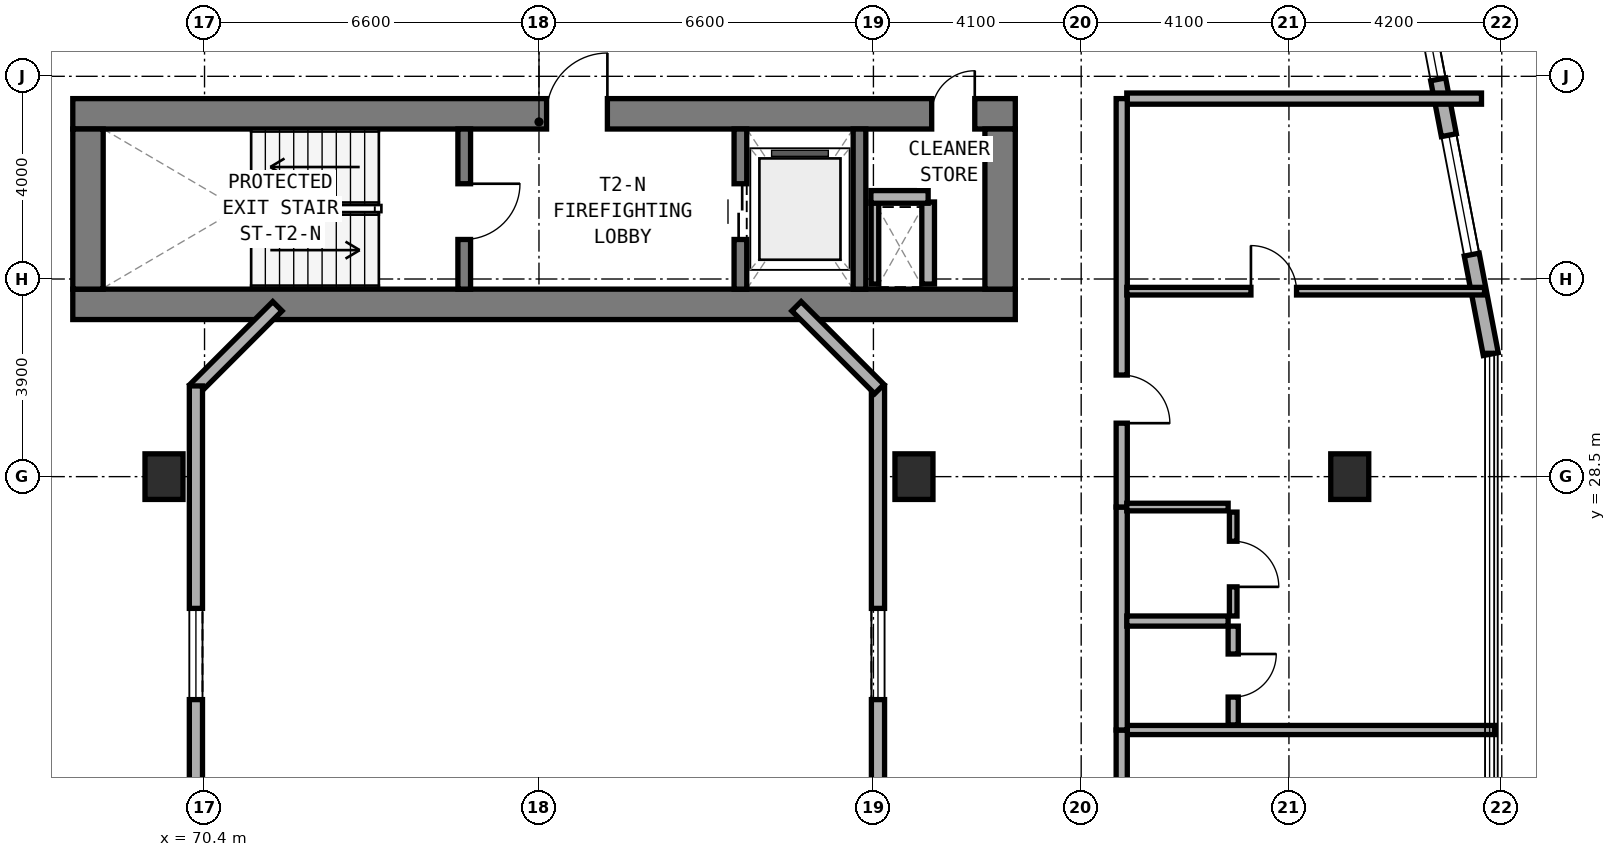
"""IFC4 building model, lengths in metres.
Left out: names, types, materials, properties, quantities, classifications, styles, units other than length and angle.
Written with IfcOpenShell. Run it as: python <this file> out.ifc"""

import sys

from ifc_helpers import new_model, si_unit, direction, frame, frame_2d, origin, origin_2d, place, context, subcontext, project, spatial, rectangle, extrude, element, fill, save


model = new_model("IFC4")
c1 = context("Model", 3, precision=1e-05, world=origin(), true_north=direction((0.0, 1.0)))
c2 = subcontext(c1, "Body", "Model", "MODEL_VIEW")
j1 = project(units=[si_unit("LENGTHUNIT", "METRE"), si_unit("PLANEANGLEUNIT", "RADIAN")], contexts=[c1])
p1 = place(None, origin())
s1 = spatial("IfcSite", under=j1, at=p1, CompositionType="ELEMENT")
p2 = place(p1, origin())
s2 = spatial("IfcBuilding", under=s1, at=p2, CompositionType="ELEMENT")
p3 = place(p2, frame((0.0, 0.0, 48.5)))
s3 = spatial("IfcBuildingStorey", under=s2, at=p3, CompositionType="ELEMENT", Elevation=48.5)
p4 = place(p3, frame((67.8, 31.9, 0.0), z_axis=(0.0, 0.0, 1.0), x_axis=(1.0, 0.0, 0.0)))
e1 = element("IfcWall", 1, at=p4, inside=s3, PredefinedType="SHEAR", context=c2, shape_type="SweptSolid", body=[
    extrude(rectangle(XDim=18.6, YDim=0.6, at=frame_2d((9.3, 0.0))), origin(), (0.0, 0.0, 1.0), 3.5),
])
p5 = place(p3, frame((67.8, 35.66, 0.0), z_axis=(0.0, 0.0, 1.0), x_axis=(1.0, 0.0, 0.0)))
e2 = element("IfcWall", 2, at=p5, inside=s3, PredefinedType="SHEAR", context=c2, shape_type="SweptSolid", body=[
    extrude(rectangle(XDim=18.6, YDim=0.6, at=frame_2d((9.3, 0.0))), origin(), (0.0, 0.0, 1.0), 3.5),
])
p6 = place(p5, frame((9.35, 0.0, 0.0)))
e3 = element("IfcOpeningElement", 3, at=p6, cuts=e2, PredefinedType="OPENING", context=c2, shape_type="SweptSolid", body=[
    extrude(rectangle(XDim=1.2, YDim=2.15, at=frame_2d((0.6, 1.075))), frame((0.0, 0.31, 0.0), z_axis=(0.0, -1.0, 0.0), x_axis=(1.0, 0.0, 0.0)), (0.0, 0.0, 1.0), 0.62),
])
p7 = place(p5, frame((16.95, 0.0, 0.0)))
e4 = element("IfcOpeningElement", 4, at=p7, cuts=e2, PredefinedType="OPENING", context=c2, shape_type="SweptSolid", body=[
    extrude(rectangle(XDim=0.85, YDim=2.1, at=frame_2d((0.425, 1.05))), frame((0.0, 0.31, 0.0), z_axis=(0.0, -1.0, 0.0), x_axis=(1.0, 0.0, 0.0)), (0.0, 0.0, 1.0), 0.62),
])
for number, where, z_axis, x_axis in (
    (5, (68.1, 32.2, 0.0), (0.0, 0.0, 1.0), (0.0, 1.0, 0.0)),
    (6, (86.1, 32.2, 0.0), (0.0, 0.0, 1.0), (0.0, 1.0, 0.0)),
):
    element("IfcWall", number, at=place(p3, frame(where, z_axis=z_axis, x_axis=x_axis)), inside=s3, PredefinedType="SHEAR", context=c2, shape_type="SweptSolid", body=[
        extrude(rectangle(XDim=3.16, YDim=0.6, at=frame_2d((1.58, 0.0))), origin(), (0.0, 0.0, 1.0), 3.5),
    ])
p8 = place(p3, frame((75.525, 32.2, 0.0), z_axis=(0.0, 0.0, 1.0), x_axis=(0.0, 1.0, 0.0)))
e7 = element("IfcWall", 7, at=p8, inside=s3, PredefinedType="STANDARD", context=c2, shape_type="SweptSolid", body=[
    extrude(rectangle(XDim=3.16, YDim=0.25, at=frame_2d((1.58, 0.0))), origin(), (0.0, 0.0, 1.0), 3.25),
])
p9 = place(p8, frame((0.98, 0.0, 0.0)))
e8 = element("IfcOpeningElement", 8, at=p9, cuts=e7, PredefinedType="OPENING", context=c2, shape_type="SweptSolid", body=[
    extrude(rectangle(XDim=1.1, YDim=2.15, at=frame_2d((0.55, 1.075))), frame((0.0, 0.135, 0.0), z_axis=(0.0, -1.0, 0.0), x_axis=(1.0, 0.0, 0.0)), (0.0, 0.0, 1.0), 0.27),
])
p10 = place(p3, frame((80.975, 32.2, 0.0), z_axis=(0.0, 0.0, 1.0), x_axis=(0.0, 1.0, 0.0)))
e9 = element("IfcWall", 9, at=p10, inside=s3, PredefinedType="STANDARD", context=c2, shape_type="SweptSolid", body=[
    extrude(rectangle(XDim=3.16, YDim=0.25, at=frame_2d((1.58, 0.0))), origin(), (0.0, 0.0, 1.0), 3.25),
])
p11 = place(p10, frame((0.98, 0.0, 0.0)))
e10 = element("IfcOpeningElement", 10, at=p11, cuts=e9, PredefinedType="OPENING", context=c2, shape_type="SweptSolid", body=[
    extrude(rectangle(XDim=1.1, YDim=2.15, at=frame_2d((0.55, 1.075))), frame((0.0, 0.135, 0.0), z_axis=(0.0, -1.0, 0.0), x_axis=(1.0, 0.0, 0.0)), (0.0, 0.0, 1.0), 0.27),
])
p12 = place(p3, frame((83.325, 32.2, 0.0), z_axis=(0.0, 0.0, 1.0), x_axis=(0.0, 1.0, 0.0)))
e11 = element("IfcWall", 11, at=p12, inside=s3, PredefinedType="STANDARD", context=c2, shape_type="SweptSolid", body=[
    extrude(rectangle(XDim=3.16, YDim=0.25, at=frame_2d((1.58, 0.0))), origin(), (0.0, 0.0, 1.0), 3.25),
])
for number, where, z_axis, x_axis in (
    (12, (93.0, 28.5, 0.0), (0.0, 0.0, 1.0), (1.0, 0.0, 0.0)),
    (13, (69.6, 28.5, 0.0), (0.0, 0.0, 1.0), (1.0, 0.0, 0.0)),
    (14, (84.4, 28.5, 0.0), (0.0, 0.0, 1.0), (1.0, 0.0, 0.0)),
):
    element("IfcColumn", number, at=place(p3, frame(where, z_axis=z_axis, x_axis=x_axis)), inside=s3, PredefinedType="COLUMN", context=c2, shape_type="SweptSolid", body=[
        extrude(rectangle(XDim=0.75, YDim=0.9, at=origin_2d()), origin(), (0.0, 0.0, 1.0), 3.5),
    ])
p13 = place(p3, frame((95.783, 30.918, 0.0), z_axis=(0.0, 0.0, 1.0), x_axis=(-0.188087874316, 0.982152203854, 0.0)))
e15 = element("IfcWall", 15, at=p13, inside=s3, PredefinedType="STANDARD", context=c2, shape_type="SweptSolid", body=[
    extrude(rectangle(XDim=9.634, YDim=0.3, at=frame_2d((4.817, 0.0))), origin(), (0.0, 0.0, 1.0), 3.25),
])
p14 = place(p13, frame((1.999, 0.0, 0.8)))
e16 = element("IfcOpeningElement", 16, at=p14, cuts=e15, PredefinedType="OPENING", context=c2, shape_type="SweptSolid", body=[
    extrude(rectangle(XDim=2.4, YDim=1.6, at=frame_2d((1.2, 0.8))), frame((0.0, 0.16, 0.0), z_axis=(0.0, -1.0, 0.0), x_axis=(1.0, 0.0, 0.0)), (0.0, 0.0, 1.0), 0.32),
])
p15 = place(p13, frame((5.521, 0.0, 0.85)))
e17 = element("IfcOpeningElement", 17, at=p15, cuts=e15, PredefinedType="OPENING", context=c2, shape_type="SweptSolid", body=[
    extrude(rectangle(XDim=1.2, YDim=1.5, at=frame_2d((0.6, 0.75))), frame((0.0, 0.16, 0.0), z_axis=(0.0, -1.0, 0.0), x_axis=(1.0, 0.0, 0.0)), (0.0, 0.0, 1.0), 0.32),
])
p16 = place(p13, frame((7.682, 0.0, 0.85)))
e18 = element("IfcOpeningElement", 18, at=p16, cuts=e15, PredefinedType="OPENING", context=c2, shape_type="SweptSolid", body=[
    extrude(rectangle(XDim=1.5, YDim=1.5, at=frame_2d((0.75, 0.75))), frame((0.0, 0.16, 0.0), z_axis=(0.0, -1.0, 0.0), x_axis=(1.0, 0.0, 0.0)), (0.0, 0.0, 1.0), 0.32),
])
p17 = place(p3, frame((83.69, 19.71, 0.0), z_axis=(0.0, 0.0, 1.0), x_axis=(0.0, 1.0, 0.0)))
e19 = element("IfcWall", 19, at=p17, inside=s3, PredefinedType="STANDARD", context=c2, shape_type="SweptSolid", body=[
    extrude(rectangle(XDim=10.58, YDim=0.26, at=frame_2d((5.29, 0.0))), origin(), (0.0, 0.0, 1.0), 3.25),
])
p18 = place(p17, frame((4.39, 0.0, 0.85)))
e20 = element("IfcOpeningElement", 20, at=p18, cuts=e19, PredefinedType="OPENING", context=c2, shape_type="SweptSolid", body=[
    extrude(rectangle(XDim=1.8, YDim=1.5, at=frame_2d((0.9, 0.75))), frame((0.0, 0.14, 0.0), z_axis=(0.0, -1.0, 0.0), x_axis=(1.0, 0.0, 0.0)), (0.0, 0.0, 1.0), 0.28),
])
for number, where, z_axis, x_axis in (
    (21, (83.716, 30.228, 0.0), (0.0, 0.0, 1.0), (-0.707, 0.707, 0.0)),
    (22, (71.838, 31.862, 0.0), (0.0, 0.0, 1.0), (-0.707, -0.707, 0.0)),
):
    element("IfcWall", number, at=place(p3, frame(where, z_axis=z_axis, x_axis=x_axis)), inside=s3, PredefinedType="STANDARD", context=c2, shape_type="SweptSolid", body=[
        extrude(rectangle(XDim=2.311, YDim=0.26, at=frame_2d((1.155, 0.0))), origin(), (0.0, 0.0, 1.0), 3.25),
    ])
p19 = place(p3, frame((70.23, 30.29, 0.0), z_axis=(0.0, 0.0, 1.0), x_axis=(0.0, -1.0, 0.0)))
e23 = element("IfcWall", 23, at=p19, inside=s3, PredefinedType="STANDARD", context=c2, shape_type="SweptSolid", body=[
    extrude(rectangle(XDim=10.58, YDim=0.26, at=frame_2d((5.29, 0.0))), origin(), (0.0, 0.0, 1.0), 3.25),
])
p20 = place(p19, frame((4.39, 0.0, 0.85)))
e24 = element("IfcOpeningElement", 24, at=p20, cuts=e23, PredefinedType="OPENING", context=c2, shape_type="SweptSolid", body=[
    extrude(rectangle(XDim=1.8, YDim=1.5, at=frame_2d((0.9, 0.75))), frame((0.0, 0.14, 0.0), z_axis=(0.0, -1.0, 0.0), x_axis=(1.0, 0.0, 0.0)), (0.0, 0.0, 1.0), 0.28),
])
p21 = place(p3, frame((83.63, 32.3, 0.0), z_axis=(0.0, 0.0, 1.0), x_axis=(0.0, 1.0, 0.0)))
e25 = element("IfcWall", 25, at=p21, inside=s3, PredefinedType="PARTITIONING", context=c2, shape_type="SweptSolid", body=[
    extrude(rectangle(XDim=1.62, YDim=0.15, at=frame_2d((0.81, 0.0))), origin(), (0.0, 0.0, 1.0), 2.725),
])
p22 = place(p3, frame((84.68, 32.3, 0.0), z_axis=(0.0, 0.0, 1.0), x_axis=(0.0, 1.0, 0.0)))
e26 = element("IfcWall", 26, at=p22, inside=s3, PredefinedType="SOLIDWALL", context=c2, shape_type="SweptSolid", body=[
    extrude(rectangle(XDim=1.62, YDim=0.25, at=frame_2d((0.81, 0.0))), origin(), (0.0, 0.0, 1.0), 3.22),
])
p23 = place(p3, frame((83.55, 34.02, 0.0), z_axis=(0.0, 0.0, 1.0), x_axis=(1.0, 0.0, 0.0)))
e27 = element("IfcWall", 27, at=p23, inside=s3, PredefinedType="SOLIDWALL", context=c2, shape_type="SweptSolid", body=[
    extrude(rectangle(XDim=1.13, YDim=0.25, at=frame_2d((0.565, 0.0))), origin(), (0.0, 0.0, 1.0), 3.22),
])
p24 = place(p3, frame((88.6, 35.96, 0.0), z_axis=(0.0, 0.0, 1.0), x_axis=(1.0, 0.0, 0.0)))
e28 = element("IfcWall", 28, at=p24, inside=s3, PredefinedType="SOLIDWALL", context=c2, shape_type="SweptSolid", body=[
    extrude(rectangle(XDim=7.0, YDim=0.22, at=frame_2d((3.5, 0.0))), origin(), (0.0, 0.0, 1.0), 2.865),
])
p25 = place(p3, frame((88.5, 23.5, 0.0), z_axis=(0.0, 0.0, 1.0), x_axis=(1.0, 0.0, 0.0)))
e29 = element("IfcWall", 29, at=p25, inside=s3, PredefinedType="SOLIDWALL", context=c2, shape_type="SweptSolid", body=[
    extrude(rectangle(XDim=7.36, YDim=0.18, at=frame_2d((3.68, 0.0))), origin(), (0.0, 0.0, 1.0), 2.865),
])
p26 = place(p3, frame((88.5, 18.44, 0.0), z_axis=(0.0, 0.0, 1.0), x_axis=(0.0, 1.0, 0.0)))
e30 = element("IfcWall", 30, at=p26, inside=s3, PredefinedType="SOLIDWALL", context=c2, shape_type="SweptSolid", body=[
    extrude(rectangle(XDim=5.06, YDim=0.22, at=frame_2d((2.53, 0.0))), origin(), (0.0, 0.0, 1.0), 2.725),
])
p27 = place(p26, frame((2.055, 0.0, 0.0)))
e31 = element("IfcOpeningElement", 31, at=p27, cuts=e30, PredefinedType="OPENING", context=c2, shape_type="SweptSolid", body=[
    extrude(rectangle(XDim=0.95, YDim=2.1, at=frame_2d((0.475, 1.05))), frame((0.0, 0.12, 0.0), z_axis=(0.0, -1.0, 0.0), x_axis=(1.0, 0.0, 0.0)), (0.0, 0.0, 1.0), 0.24),
])
p28 = place(p3, frame((88.5, 23.5, 0.0), z_axis=(0.0, 0.0, 1.0), x_axis=(0.0, 1.0, 0.0)))
e32 = element("IfcWall", 32, at=p28, inside=s3, PredefinedType="SOLIDWALL", context=c2, shape_type="SweptSolid", body=[
    extrude(rectangle(XDim=4.4, YDim=0.22, at=frame_2d((2.2, 0.0))), origin(), (0.0, 0.0, 1.0), 3.22),
])
p29 = place(p3, frame((88.5, 27.9, 0.0), z_axis=(0.0, 0.0, 1.0), x_axis=(0.0, 1.0, 0.0)))
e33 = element("IfcWall", 33, at=p29, inside=s3, PredefinedType="SOLIDWALL", context=c2, shape_type="SweptSolid", body=[
    extrude(rectangle(XDim=8.06, YDim=0.22, at=frame_2d((4.03, 0.0))), origin(), (0.0, 0.0, 1.0), 2.725),
])
p30 = place(p29, frame((1.655, 0.0, 0.0)))
e34 = element("IfcOpeningElement", 34, at=p30, cuts=e33, PredefinedType="OPENING", context=c2, shape_type="SweptSolid", body=[
    extrude(rectangle(XDim=0.95, YDim=2.1, at=frame_2d((0.475, 1.05))), frame((0.0, 0.12, 0.0), z_axis=(0.0, -1.0, 0.0), x_axis=(1.0, 0.0, 0.0)), (0.0, 0.0, 1.0), 0.24),
])
p31 = place(p3, frame((88.6, 32.16, 0.0), z_axis=(0.0, 0.0, 1.0), x_axis=(1.0, 0.0, 0.0)))
e35 = element("IfcWall", 35, at=p31, inside=s3, PredefinedType="PARTITIONING", context=c2, shape_type="SweptSolid", body=[
    extrude(rectangle(XDim=7.06, YDim=0.15, at=frame_2d((3.53, 0.0))), origin(), (0.0, 0.0, 1.0), 2.865),
])
p32 = place(p31, frame((2.45, 0.0, 0.0)))
e36 = element("IfcOpeningElement", 36, at=p32, cuts=e35, PredefinedType="OPENING", context=c2, shape_type="SweptSolid", body=[
    extrude(rectangle(XDim=0.9, YDim=2.1, at=frame_2d((0.45, 1.05))), frame((0.0, 0.085, 0.0), z_axis=(0.0, -1.0, 0.0), x_axis=(1.0, 0.0, 0.0)), (0.0, 0.0, 1.0), 0.17),
])
p33 = place(p3, frame((88.6, 25.65, 0.0), z_axis=(0.0, 0.0, 1.0), x_axis=(1.0, 0.0, 0.0)))
e37 = element("IfcWall", 37, at=p33, inside=s3, PredefinedType="PLUMBINGWALL", context=c2, shape_type="SweptSolid", body=[
    extrude(rectangle(XDim=2.0, YDim=0.2, at=frame_2d((1.0, 0.0))), origin(), (0.0, 0.0, 1.0), 3.22),
])
p34 = place(p3, frame((88.6, 27.9, 0.0), z_axis=(0.0, 0.0, 1.0), x_axis=(1.0, 0.0, 0.0)))
e38 = element("IfcWall", 38, at=p34, inside=s3, PredefinedType="PARTITIONING", context=c2, shape_type="SweptSolid", body=[
    extrude(rectangle(XDim=2.0, YDim=0.15, at=frame_2d((1.0, 0.0))), origin(), (0.0, 0.0, 1.0), 3.22),
])
p35 = place(p3, frame((90.7, 23.6, 0.0), z_axis=(0.0, 0.0, 1.0), x_axis=(0.0, 1.0, 0.0)))
e39 = element("IfcWall", 39, at=p35, inside=s3, PredefinedType="PLUMBINGWALL", context=c2, shape_type="SweptSolid", body=[
    extrude(rectangle(XDim=1.95, YDim=0.2, at=frame_2d((0.975, 0.0))), origin(), (0.0, 0.0, 1.0), 3.22),
])
p36 = place(p35, frame((0.55, 0.0, 0.0)))
e40 = element("IfcOpeningElement", 40, at=p36, cuts=e39, PredefinedType="OPENING", context=c2, shape_type="SweptSolid", body=[
    extrude(rectangle(XDim=0.85, YDim=2.1, at=frame_2d((0.425, 1.05))), frame((0.0, 0.11, 0.0), z_axis=(0.0, -1.0, 0.0), x_axis=(1.0, 0.0, 0.0)), (0.0, 0.0, 1.0), 0.22),
])
p37 = place(p3, frame((90.7, 25.75, 0.0), z_axis=(0.0, 0.0, 1.0), x_axis=(0.0, 1.0, 0.0)))
e41 = element("IfcWall", 41, at=p37, inside=s3, PredefinedType="PARTITIONING", context=c2, shape_type="SweptSolid", body=[
    extrude(rectangle(XDim=2.05, YDim=0.15, at=frame_2d((1.025, 0.0))), origin(), (0.0, 0.0, 1.0), 3.22),
])
p38 = place(p37, frame((0.575, 0.0, 0.0)))
e42 = element("IfcOpeningElement", 42, at=p38, cuts=e41, PredefinedType="OPENING", context=c2, shape_type="SweptSolid", body=[
    extrude(rectangle(XDim=0.9, YDim=2.1, at=frame_2d((0.45, 1.05))), frame((0.0, 0.085, 0.0), z_axis=(0.0, -1.0, 0.0), x_axis=(1.0, 0.0, 0.0)), (0.0, 0.0, 1.0), 0.17),
])
p39 = place(p14, origin())
e43 = element("IfcWindow", 43, at=p39, inside=s3, PartitioningType="SINGLE_PANEL", PredefinedType="WINDOW", context=c2, shape_type="SweptSolid", body=[
    extrude(rectangle(XDim=2.4, YDim=1.6, at=frame_2d((1.2, 0.8))), frame((0.0, 0.03, 0.0), z_axis=(0.0, -1.0, 0.0), x_axis=(1.0, 0.0, 0.0)), (0.0, 0.0, 1.0), 0.06),
])
fill(e16, e43)
p40 = place(p15, origin())
e44 = element("IfcWindow", 44, at=p40, inside=s3, PartitioningType="SINGLE_PANEL", PredefinedType="WINDOW", context=c2, shape_type="SweptSolid", body=[
    extrude(rectangle(XDim=1.2, YDim=1.5, at=frame_2d((0.6, 0.75))), frame((0.0, 0.03, 0.0), z_axis=(0.0, -1.0, 0.0), x_axis=(1.0, 0.0, 0.0)), (0.0, 0.0, 1.0), 0.06),
])
fill(e17, e44)
p41 = place(p18, origin())
e45 = element("IfcWindow", 45, at=p41, inside=s3, PartitioningType="SINGLE_PANEL", PredefinedType="WINDOW", context=c2, shape_type="SweptSolid", body=[
    extrude(rectangle(XDim=1.8, YDim=1.5, at=frame_2d((0.9, 0.75))), frame((0.0, 0.03, 0.0), z_axis=(0.0, -1.0, 0.0), x_axis=(1.0, 0.0, 0.0)), (0.0, 0.0, 1.0), 0.06),
])
fill(e20, e45)
p42 = place(p20, origin())
e46 = element("IfcWindow", 46, at=p42, inside=s3, PartitioningType="SINGLE_PANEL", PredefinedType="WINDOW", context=c2, shape_type="SweptSolid", body=[
    extrude(rectangle(XDim=1.8, YDim=1.5, at=frame_2d((0.9, 0.75))), frame((0.0, 0.03, 0.0), z_axis=(0.0, -1.0, 0.0), x_axis=(1.0, 0.0, 0.0)), (0.0, 0.0, 1.0), 0.06),
])
fill(e24, e46)
p43 = place(p9, frame((1.1, 0.0, 0.0), z_axis=(0.0, 0.0, 1.0), x_axis=(-1.0, 0.0, 0.0)))
e47 = element("IfcDoor", 47, at=p43, inside=s3, OperationType="SINGLE_SWING_LEFT", PredefinedType="DOOR", context=c2, shape_type="SweptSolid", body=[
    extrude(rectangle(XDim=1.1, YDim=2.15, at=frame_2d((0.55, 1.075))), frame((0.0, 0.025, 0.0), z_axis=(0.0, -1.0, 0.0), x_axis=(1.0, 0.0, 0.0)), (0.0, 0.0, 1.0), 0.05),
])
fill(e8, e47)
p44 = place(p6, origin())
e48 = element("IfcDoor", 48, at=p44, inside=s3, OperationType="SINGLE_SWING_RIGHT", PredefinedType="DOOR", context=c2, shape_type="SweptSolid", body=[
    extrude(rectangle(XDim=1.2, YDim=2.15, at=frame_2d((0.6, 1.075))), frame((0.0, 0.025, 0.0), z_axis=(0.0, -1.0, 0.0), x_axis=(1.0, 0.0, 0.0)), (0.0, 0.0, 1.0), 0.05),
])
fill(e3, e48)
p45 = place(p11, origin())
e49 = element("IfcDoor", 49, at=p45, inside=s3, OperationType="DOUBLE_DOOR_SLIDING", PredefinedType="DOOR", context=c2, shape_type="SweptSolid", body=[
    extrude(rectangle(XDim=1.1, YDim=2.15, at=frame_2d((0.55, 1.075))), frame((0.0, 0.025, 0.0), z_axis=(0.0, -1.0, 0.0), x_axis=(1.0, 0.0, 0.0)), (0.0, 0.0, 1.0), 0.05),
])
fill(e10, e49)
p46 = place(p7, origin())
e50 = element("IfcDoor", 50, at=p46, inside=s3, OperationType="SINGLE_SWING_RIGHT", PredefinedType="DOOR", context=c2, shape_type="SweptSolid", body=[
    extrude(rectangle(XDim=0.85, YDim=2.1, at=frame_2d((0.425, 1.05))), frame((0.0, 0.025, 0.0), z_axis=(0.0, -1.0, 0.0), x_axis=(1.0, 0.0, 0.0)), (0.0, 0.0, 1.0), 0.05),
])
fill(e4, e50)
p47 = place(p30, frame((0.95, 0.0, 0.0), z_axis=(0.0, 0.0, 1.0), x_axis=(-1.0, 0.0, 0.0)))
e51 = element("IfcDoor", 51, at=p47, inside=s3, OperationType="SINGLE_SWING_RIGHT", PredefinedType="DOOR", context=c2, shape_type="SweptSolid", body=[
    extrude(rectangle(XDim=0.95, YDim=2.1, at=frame_2d((0.475, 1.05))), frame((0.0, 0.025, 0.0), z_axis=(0.0, -1.0, 0.0), x_axis=(1.0, 0.0, 0.0)), (0.0, 0.0, 1.0), 0.05),
])
fill(e34, e51)
p48 = place(p32, origin())
e52 = element("IfcDoor", 52, at=p48, inside=s3, OperationType="SINGLE_SWING_LEFT", PredefinedType="DOOR", context=c2, shape_type="SweptSolid", body=[
    extrude(rectangle(XDim=0.9, YDim=2.1, at=frame_2d((0.45, 1.05))), frame((0.0, 0.025, 0.0), z_axis=(0.0, -1.0, 0.0), x_axis=(1.0, 0.0, 0.0)), (0.0, 0.0, 1.0), 0.05),
])
fill(e36, e52)
p49 = place(p36, frame((0.85, 0.0, 0.0), z_axis=(0.0, 0.0, 1.0), x_axis=(-1.0, 0.0, 0.0)))
e53 = element("IfcDoor", 53, at=p49, inside=s3, OperationType="SINGLE_SWING_LEFT", PredefinedType="DOOR", context=c2, shape_type="SweptSolid", body=[
    extrude(rectangle(XDim=0.85, YDim=2.1, at=frame_2d((0.425, 1.05))), frame((0.0, 0.025, 0.0), z_axis=(0.0, -1.0, 0.0), x_axis=(1.0, 0.0, 0.0)), (0.0, 0.0, 1.0), 0.05),
])
fill(e40, e53)
p50 = place(p38, frame((0.9, 0.0, 0.0), z_axis=(0.0, 0.0, 1.0), x_axis=(-1.0, 0.0, 0.0)))
e54 = element("IfcDoor", 54, at=p50, inside=s3, OperationType="SINGLE_SWING_RIGHT", PredefinedType="DOOR", context=c2, shape_type="SweptSolid", body=[
    extrude(rectangle(XDim=0.9, YDim=2.1, at=frame_2d((0.45, 1.05))), frame((0.0, 0.025, 0.0), z_axis=(0.0, -1.0, 0.0), x_axis=(1.0, 0.0, 0.0)), (0.0, 0.0, 1.0), 0.05),
])
fill(e42, e54)
save(model, sys.argv[1])
